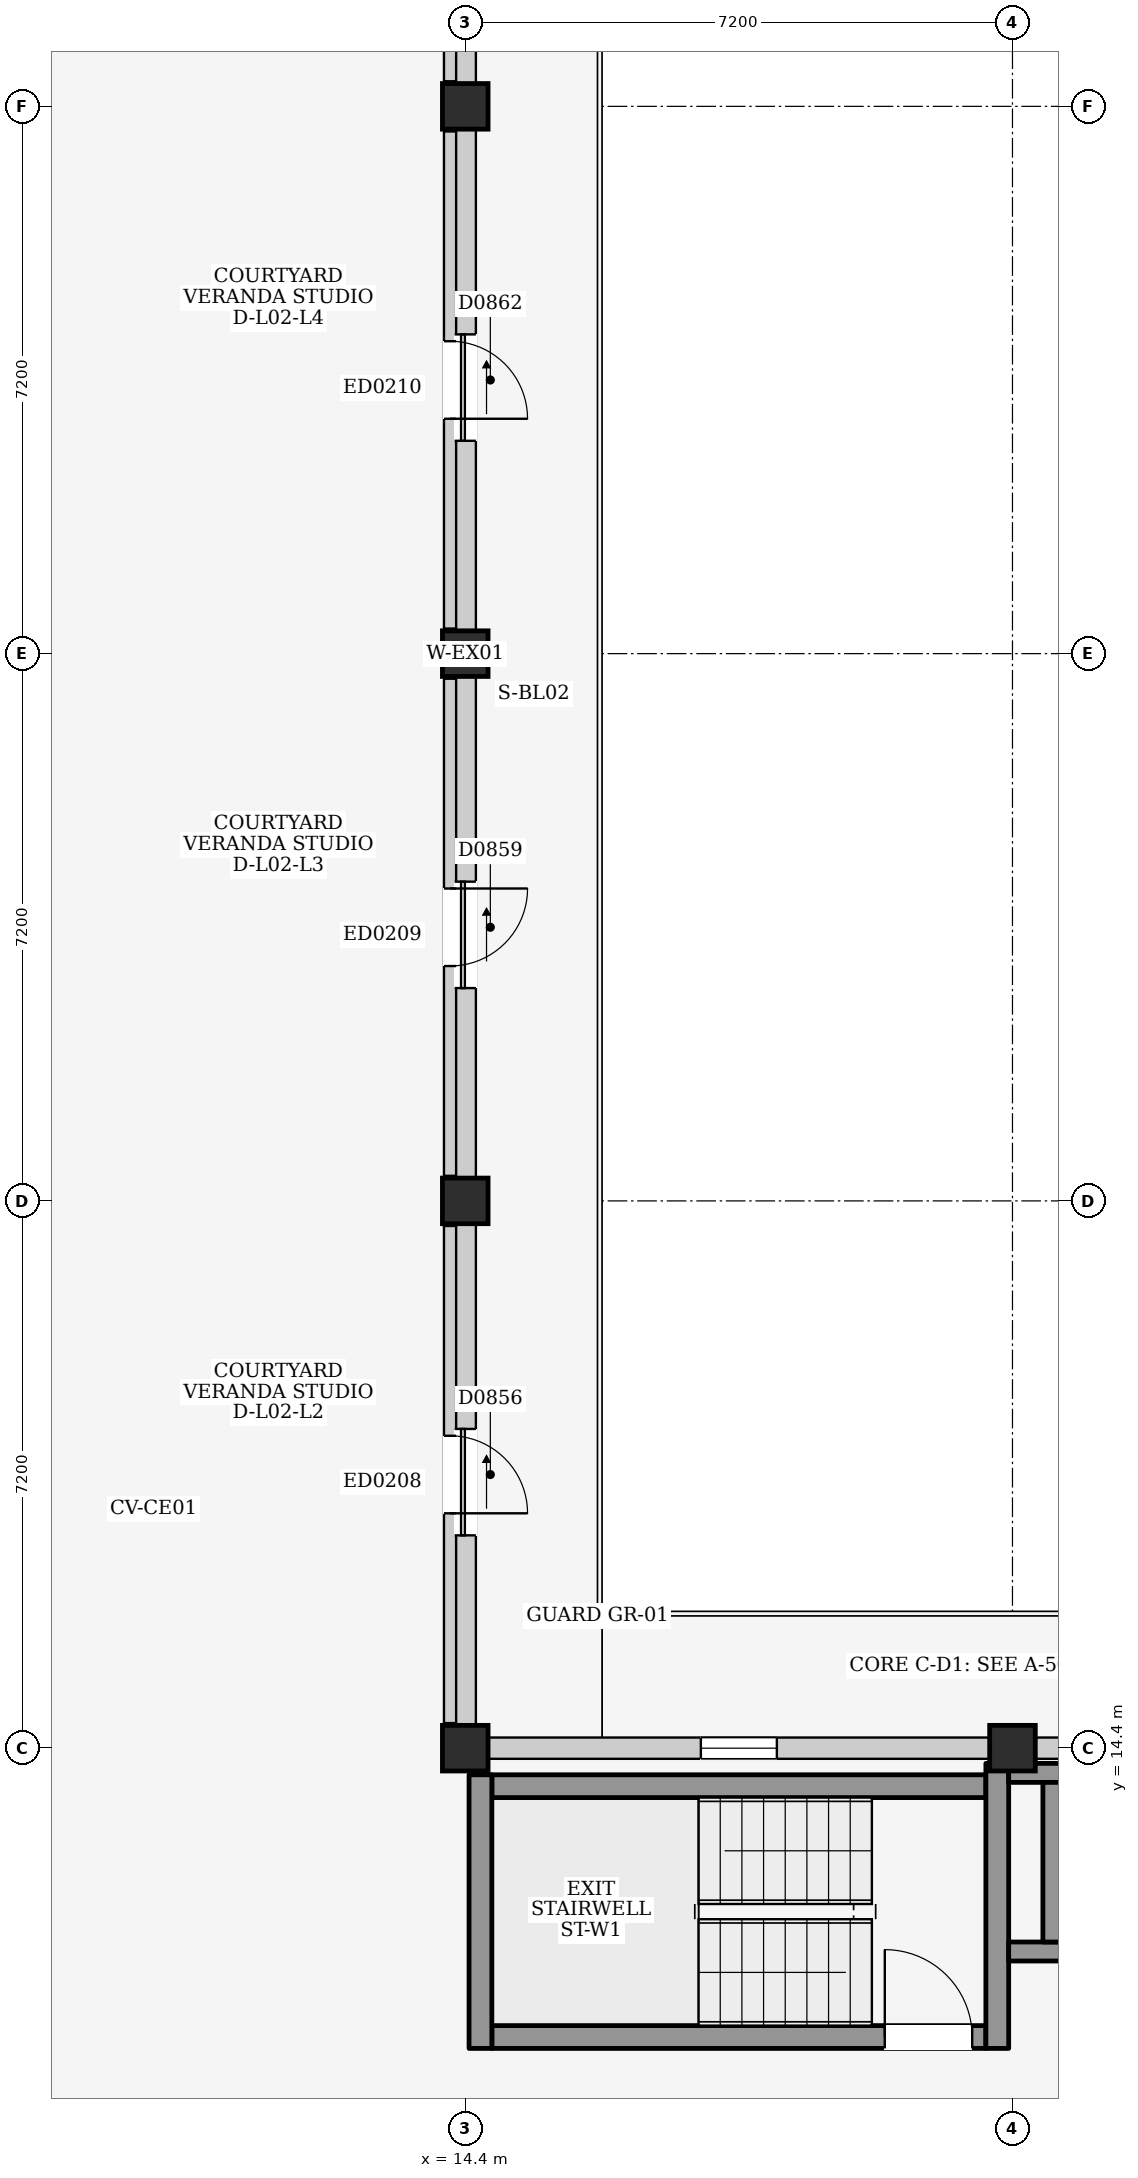
"""IFC4 building model, lengths in metres.
Left out: names, types, materials, properties, quantities, classifications, styles, units other than length and angle.
Written with IfcOpenShell. Run it as: python <this file> out.ifc"""

import sys

from ifc_helpers import new_model, si_unit, direction, frame, frame_2d, origin, origin_2d, place, context, subcontext, project, spatial, rectangle, extrude, element, fill, save


model = new_model("IFC4")
c1 = context("Model", 3, precision=1e-05, world=origin(), true_north=direction((0.0, 1.0)))
c2 = subcontext(c1, "Body", "Model", "MODEL_VIEW")
j1 = project(units=[si_unit("LENGTHUNIT", "METRE"), si_unit("PLANEANGLEUNIT", "RADIAN")], contexts=[c1])
p1 = place(None, origin())
s1 = spatial("IfcSite", under=j1, at=p1, CompositionType="ELEMENT")
p2 = place(p1, origin())
s2 = spatial("IfcBuilding", under=s1, at=p2, CompositionType="ELEMENT")
p3 = place(p2, frame((0.0, 0.0, 9.0)))
s3 = spatial("IfcBuildingStorey", under=s2, at=p3, CompositionType="ELEMENT", Elevation=9.0)
for number, where, z_axis, x_axis in (
    (1, (14.4, 14.4, 0.0), (0.0, 0.0, 1.0), (1.0, 0.0, 0.0)),
    (2, (14.4, 21.6, 0.0), (0.0, 0.0, 1.0), (1.0, 0.0, 0.0)),
    (3, (14.4, 28.8, 0.0), (0.0, 0.0, 1.0), (1.0, 0.0, 0.0)),
    (4, (14.4, 36.0, 0.0), (0.0, 0.0, 1.0), (1.0, 0.0, 0.0)),
    (5, (21.6, 14.4, 0.0), (0.0, 0.0, 1.0), (1.0, 0.0, 0.0)),
):
    element("IfcColumn", number, at=place(p3, frame(where, z_axis=z_axis, x_axis=x_axis)), inside=s3, PredefinedType="COLUMN", context=c2, shape_type="SweptSolid", body=[
        extrude(rectangle(XDim=0.6, YDim=0.6, at=origin_2d()), origin(), (0.0, 0.0, 1.0), 3.2),
    ])
p4 = place(p3, frame((14.4, 14.7, 0.0), z_axis=(0.0, 0.0, 1.0), x_axis=(0.0, 1.0, 0.0)))
e6 = element("IfcWall", 6, at=p4, inside=s3, PredefinedType="ELEMENTEDWALL", context=c2, shape_type="SweptSolid", body=[
    extrude(rectangle(XDim=6.6, YDim=0.28, at=frame_2d((3.3, 0.0))), origin(), (0.0, 0.0, 1.0), 2.395),
])
p5 = place(p4, frame((2.5, 0.0, 0.0)))
e7 = element("IfcOpeningElement", 7, at=p5, cuts=e6, PredefinedType="OPENING", context=c2, shape_type="SweptSolid", body=[
    extrude(rectangle(XDim=1.4, YDim=2.1, at=frame_2d((0.7, 1.05))), frame((0.0, 0.155, 0.0), z_axis=(0.0, -1.0, 0.0), x_axis=(1.0, 0.0, 0.0)), (0.0, 0.0, 1.0), 0.31),
])
p6 = place(p3, frame((14.4, 21.9, 0.0), z_axis=(0.0, 0.0, 1.0), x_axis=(0.0, 1.0, 0.0)))
e8 = element("IfcWall", 8, at=p6, inside=s3, PredefinedType="ELEMENTEDWALL", context=c2, shape_type="SweptSolid", body=[
    extrude(rectangle(XDim=6.6, YDim=0.28, at=frame_2d((3.3, 0.0))), origin(), (0.0, 0.0, 1.0), 2.395),
])
p7 = place(p6, frame((2.5, 0.0, 0.0)))
e9 = element("IfcOpeningElement", 9, at=p7, cuts=e8, PredefinedType="OPENING", context=c2, shape_type="SweptSolid", body=[
    extrude(rectangle(XDim=1.4, YDim=2.1, at=frame_2d((0.7, 1.05))), frame((0.0, 0.155, 0.0), z_axis=(0.0, -1.0, 0.0), x_axis=(1.0, 0.0, 0.0)), (0.0, 0.0, 1.0), 0.31),
])
p8 = place(p3, frame((14.4, 29.1, 0.0), z_axis=(0.0, 0.0, 1.0), x_axis=(0.0, 1.0, 0.0)))
e10 = element("IfcWall", 10, at=p8, inside=s3, PredefinedType="ELEMENTEDWALL", context=c2, shape_type="SweptSolid", body=[
    extrude(rectangle(XDim=6.6, YDim=0.28, at=frame_2d((3.3, 0.0))), origin(), (0.0, 0.0, 1.0), 2.395),
])
p9 = place(p8, frame((2.5, 0.0, 0.0)))
e11 = element("IfcOpeningElement", 11, at=p9, cuts=e10, PredefinedType="OPENING", context=c2, shape_type="SweptSolid", body=[
    extrude(rectangle(XDim=1.4, YDim=2.1, at=frame_2d((0.7, 1.05))), frame((0.0, 0.155, 0.0), z_axis=(0.0, -1.0, 0.0), x_axis=(1.0, 0.0, 0.0)), (0.0, 0.0, 1.0), 0.31),
])
p10 = place(p3, frame((14.4, 36.3, 0.0), z_axis=(0.0, 0.0, 1.0), x_axis=(0.0, 1.0, 0.0)))
e12 = element("IfcWall", 12, at=p10, inside=s3, PredefinedType="ELEMENTEDWALL", context=c2, shape_type="SweptSolid", body=[
    extrude(rectangle(XDim=6.6, YDim=0.28, at=frame_2d((3.3, 0.0))), origin(), (0.0, 0.0, 1.0), 2.395),
])
p11 = place(p10, frame((2.5, 0.0, 0.0)))
e13 = element("IfcOpeningElement", 13, at=p11, cuts=e12, PredefinedType="OPENING", context=c2, shape_type="SweptSolid", body=[
    extrude(rectangle(XDim=1.4, YDim=2.1, at=frame_2d((0.7, 1.05))), frame((0.0, 0.155, 0.0), z_axis=(0.0, -1.0, 0.0), x_axis=(1.0, 0.0, 0.0)), (0.0, 0.0, 1.0), 0.31),
])
p12 = place(p3, frame((14.7, 14.4, 0.0), z_axis=(0.0, 0.0, 1.0), x_axis=(1.0, 0.0, 0.0)))
e14 = element("IfcWall", 14, at=p12, inside=s3, PredefinedType="ELEMENTEDWALL", context=c2, shape_type="SweptSolid", body=[
    extrude(rectangle(XDim=6.6, YDim=0.28, at=frame_2d((3.3, 0.0))), origin(), (0.0, 0.0, 1.0), 2.345),
])
p13 = place(p12, frame((2.8, 0.0, 1.2)))
e15 = element("IfcOpeningElement", 15, at=p13, cuts=e14, PredefinedType="OPENING", context=c2, shape_type="SweptSolid", body=[
    extrude(rectangle(XDim=1.0, YDim=0.9, at=frame_2d((0.5, 0.45))), frame((0.0, 0.155, 0.0), z_axis=(0.0, -1.0, 0.0), x_axis=(1.0, 0.0, 0.0)), (0.0, 0.0, 1.0), 0.31),
])
p14 = place(p3, frame((21.9, 14.4, 0.0), z_axis=(0.0, 0.0, 1.0), x_axis=(1.0, 0.0, 0.0)))
e16 = element("IfcWall", 16, at=p14, inside=s3, PredefinedType="ELEMENTEDWALL", context=c2, shape_type="SweptSolid", body=[
    extrude(rectangle(XDim=6.6, YDim=0.28, at=frame_2d((3.3, 0.0))), origin(), (0.0, 0.0, 1.0), 2.345),
])
p15 = place(p14, frame((2.8, 0.0, 1.2)))
e17 = element("IfcOpeningElement", 17, at=p15, cuts=e16, PredefinedType="OPENING", context=c2, shape_type="SweptSolid", body=[
    extrude(rectangle(XDim=1.0, YDim=0.9, at=frame_2d((0.5, 0.45))), frame((0.0, 0.155, 0.0), z_axis=(0.0, -1.0, 0.0), x_axis=(1.0, 0.0, 0.0)), (0.0, 0.0, 1.0), 0.31),
])
p16 = place(p3, frame((14.75, 10.6, 0.0), z_axis=(0.0, 0.0, 1.0), x_axis=(1.0, 0.0, 0.0)))
e18 = element("IfcWall", 18, at=p16, inside=s3, PredefinedType="SHEAR", context=c2, shape_type="SweptSolid", body=[
    extrude(rectangle(XDim=6.5, YDim=0.3, at=frame_2d((3.25, 0.0))), origin(), (0.0, 0.0, 1.0), 2.96),
])
p17 = place(p16, frame((5.17, 0.0, 0.0)))
e19 = element("IfcOpeningElement", 19, at=p17, cuts=e18, PredefinedType="OPENING", context=c2, shape_type="SweptSolid", body=[
    extrude(rectangle(XDim=1.15, YDim=2.2, at=frame_2d((0.575, 1.1))), frame((0.0, 0.165, 0.0), z_axis=(0.0, -1.0, 0.0), x_axis=(1.0, 0.0, 0.0)), (0.0, 0.0, 1.0), 0.33),
])
p18 = place(p3, frame((14.75, 13.9, 0.0), z_axis=(0.0, 0.0, 1.0), x_axis=(1.0, 0.0, 0.0)))
e20 = element("IfcWall", 20, at=p18, inside=s3, PredefinedType="SHEAR", context=c2, shape_type="SweptSolid", body=[
    extrude(rectangle(XDim=6.5, YDim=0.3, at=frame_2d((3.25, 0.0))), origin(), (0.0, 0.0, 1.0), 2.96),
])
p19 = place(p3, frame((14.6, 10.45, 0.0), z_axis=(0.0, 0.0, 1.0), x_axis=(0.0, 1.0, 0.0)))
e21 = element("IfcWall", 21, at=p19, inside=s3, PredefinedType="SHEAR", context=c2, shape_type="SweptSolid", body=[
    extrude(rectangle(XDim=3.6, YDim=0.3, at=frame_2d((1.8, 0.0))), origin(), (0.0, 0.0, 1.0), 2.96),
])
p20 = place(p3, frame((21.4, 10.45, 0.0), z_axis=(0.0, 0.0, 1.0), x_axis=(0.0, 1.0, 0.0)))
e22 = element("IfcWall", 22, at=p20, inside=s3, PredefinedType="SHEAR", context=c2, shape_type="SweptSolid", body=[
    extrude(rectangle(XDim=3.75, YDim=0.3, at=frame_2d((1.875, 0.0))), origin(), (0.0, 0.0, 1.0), 2.96),
])
p21 = place(p3, frame((21.55, 11.725, 0.0), z_axis=(0.0, 0.0, 1.0), x_axis=(1.0, 0.0, 0.0)))
e23 = element("IfcWall", 23, at=p21, inside=s3, PredefinedType="SHEAR", context=c2, shape_type="SweptSolid", body=[
    extrude(rectangle(XDim=2.55, YDim=0.25, at=frame_2d((1.275, 0.0))), origin(), (0.0, 0.0, 1.0), 2.96),
])
p22 = place(p21, frame((0.95, 0.0, 0.0)))
e24 = element("IfcOpeningElement", 24, at=p22, cuts=e23, PredefinedType="OPENING", context=c2, shape_type="SweptSolid", body=[
    extrude(rectangle(XDim=1.1, YDim=2.15, at=frame_2d((0.55, 1.075))), frame((0.0, 0.14, 0.0), z_axis=(0.0, -1.0, 0.0), x_axis=(1.0, 0.0, 0.0)), (0.0, 0.0, 1.0), 0.28),
])
p23 = place(p3, frame((21.55, 14.075, 0.0), z_axis=(0.0, 0.0, 1.0), x_axis=(1.0, 0.0, 0.0)))
e25 = element("IfcWall", 25, at=p23, inside=s3, PredefinedType="SHEAR", context=c2, shape_type="SweptSolid", body=[
    extrude(rectangle(XDim=2.55, YDim=0.25, at=frame_2d((1.275, 0.0))), origin(), (0.0, 0.0, 1.0), 2.96),
])
p24 = place(p3, frame((22.125, 11.85, 0.0), z_axis=(0.0, 0.0, 1.0), x_axis=(0.0, 1.0, 0.0)))
e26 = element("IfcWall", 26, at=p24, inside=s3, PredefinedType="SHEAR", context=c2, shape_type="SweptSolid", body=[
    extrude(rectangle(XDim=2.1, YDim=0.25, at=frame_2d((1.05, 0.0))), origin(), (0.0, 0.0, 1.0), 2.96),
])
p25 = place(p3, frame((14.2, 14.73, 0.0), z_axis=(0.0, 0.0, 1.0), x_axis=(0.0, 1.0, 0.0)))
e27 = element("IfcWall", 27, at=p25, inside=s3, PredefinedType="PARTITIONING", context=c2, shape_type="SweptSolid", body=[
    extrude(rectangle(XDim=6.54, YDim=0.16, at=frame_2d((3.27, 0.0))), origin(), (0.0, 0.0, 1.0), 2.395),
])
p26 = place(p25, frame((2.76, 0.0, 0.0)))
e28 = element("IfcOpeningElement", 28, at=p26, cuts=e27, PredefinedType="OPENING", context=c2, shape_type="SweptSolid", body=[
    extrude(rectangle(XDim=1.02, YDim=2.18, at=frame_2d((0.51, 1.09))), frame((0.0, 0.095, 0.0), z_axis=(0.0, -1.0, 0.0), x_axis=(1.0, 0.0, 0.0)), (0.0, 0.0, 1.0), 0.19),
])
p27 = place(p3, frame((14.2, 21.93, 0.0), z_axis=(0.0, 0.0, 1.0), x_axis=(0.0, 1.0, 0.0)))
e29 = element("IfcWall", 29, at=p27, inside=s3, PredefinedType="PARTITIONING", context=c2, shape_type="SweptSolid", body=[
    extrude(rectangle(XDim=6.54, YDim=0.16, at=frame_2d((3.27, 0.0))), origin(), (0.0, 0.0, 1.0), 2.395),
])
p28 = place(p27, frame((2.76, 0.0, 0.0)))
e30 = element("IfcOpeningElement", 30, at=p28, cuts=e29, PredefinedType="OPENING", context=c2, shape_type="SweptSolid", body=[
    extrude(rectangle(XDim=1.02, YDim=2.18, at=frame_2d((0.51, 1.09))), frame((0.0, 0.095, 0.0), z_axis=(0.0, -1.0, 0.0), x_axis=(1.0, 0.0, 0.0)), (0.0, 0.0, 1.0), 0.19),
])
p29 = place(p3, frame((14.2, 29.13, 0.0), z_axis=(0.0, 0.0, 1.0), x_axis=(0.0, 1.0, 0.0)))
e31 = element("IfcWall", 31, at=p29, inside=s3, PredefinedType="PARTITIONING", context=c2, shape_type="SweptSolid", body=[
    extrude(rectangle(XDim=6.54, YDim=0.16, at=frame_2d((3.27, 0.0))), origin(), (0.0, 0.0, 1.0), 2.395),
])
p30 = place(p29, frame((2.76, 0.0, 0.0)))
e32 = element("IfcOpeningElement", 32, at=p30, cuts=e31, PredefinedType="OPENING", context=c2, shape_type="SweptSolid", body=[
    extrude(rectangle(XDim=1.02, YDim=2.18, at=frame_2d((0.51, 1.09))), frame((0.0, 0.095, 0.0), z_axis=(0.0, -1.0, 0.0), x_axis=(1.0, 0.0, 0.0)), (0.0, 0.0, 1.0), 0.19),
])
p31 = place(p3, frame((14.2, 36.33, 0.0), z_axis=(0.0, 0.0, 1.0), x_axis=(0.0, 1.0, 0.0)))
e33 = element("IfcWall", 33, at=p31, inside=s3, PredefinedType="PARTITIONING", context=c2, shape_type="SweptSolid", body=[
    extrude(rectangle(XDim=6.54, YDim=0.16, at=frame_2d((3.27, 0.0))), origin(), (0.0, 0.0, 1.0), 2.395),
])
p32 = place(p31, frame((2.76, 0.0, 0.0)))
e34 = element("IfcOpeningElement", 34, at=p32, cuts=e33, PredefinedType="OPENING", context=c2, shape_type="SweptSolid", body=[
    extrude(rectangle(XDim=1.02, YDim=2.18, at=frame_2d((0.51, 1.09))), frame((0.0, 0.095, 0.0), z_axis=(0.0, -1.0, 0.0), x_axis=(1.0, 0.0, 0.0)), (0.0, 0.0, 1.0), 0.19),
])
p33 = place(p5, frame((1.4, 0.0, 0.0), z_axis=(0.0, 0.0, 1.0), x_axis=(-1.0, 0.0, 0.0)))
e35 = element("IfcDoor", 35, at=p33, inside=s3, OperationType="SLIDING_TO_RIGHT", PredefinedType="DOOR", context=c2, shape_type="SweptSolid", body=[
    extrude(rectangle(XDim=1.4, YDim=2.1, at=frame_2d((0.7, 1.05))), frame((0.0, 0.025, 0.0), z_axis=(0.0, -1.0, 0.0), x_axis=(1.0, 0.0, 0.0)), (0.0, 0.0, 1.0), 0.05),
])
fill(e7, e35)
p34 = place(p7, frame((1.4, 0.0, 0.0), z_axis=(0.0, 0.0, 1.0), x_axis=(-1.0, 0.0, 0.0)))
e36 = element("IfcDoor", 36, at=p34, inside=s3, OperationType="SLIDING_TO_RIGHT", PredefinedType="DOOR", context=c2, shape_type="SweptSolid", body=[
    extrude(rectangle(XDim=1.4, YDim=2.1, at=frame_2d((0.7, 1.05))), frame((0.0, 0.025, 0.0), z_axis=(0.0, -1.0, 0.0), x_axis=(1.0, 0.0, 0.0)), (0.0, 0.0, 1.0), 0.05),
])
fill(e9, e36)
p35 = place(p9, frame((1.4, 0.0, 0.0), z_axis=(0.0, 0.0, 1.0), x_axis=(-1.0, 0.0, 0.0)))
e37 = element("IfcDoor", 37, at=p35, inside=s3, OperationType="SLIDING_TO_RIGHT", PredefinedType="DOOR", context=c2, shape_type="SweptSolid", body=[
    extrude(rectangle(XDim=1.4, YDim=2.1, at=frame_2d((0.7, 1.05))), frame((0.0, 0.025, 0.0), z_axis=(0.0, -1.0, 0.0), x_axis=(1.0, 0.0, 0.0)), (0.0, 0.0, 1.0), 0.05),
])
fill(e11, e37)
p36 = place(p13, origin())
e38 = element("IfcWindow", 38, at=p36, inside=s3, PartitioningType="SINGLE_PANEL", PredefinedType="WINDOW", context=c2, shape_type="SweptSolid", body=[
    extrude(rectangle(XDim=1.0, YDim=0.9, at=frame_2d((0.5, 0.45))), frame((0.0, 0.03, 0.0), z_axis=(0.0, -1.0, 0.0), x_axis=(1.0, 0.0, 0.0)), (0.0, 0.0, 1.0), 0.06),
])
fill(e15, e38)
p37 = place(p17, origin())
e39 = element("IfcDoor", 39, at=p37, inside=s3, OperationType="SINGLE_SWING_LEFT", PredefinedType="DOOR", context=c2, shape_type="SweptSolid", body=[
    extrude(rectangle(XDim=1.15, YDim=2.2, at=frame_2d((0.575, 1.1))), frame((0.0, 0.025, 0.0), z_axis=(0.0, -1.0, 0.0), x_axis=(1.0, 0.0, 0.0)), (0.0, 0.0, 1.0), 0.05),
])
fill(e19, e39)
p38 = place(p26, frame((1.02, 0.0, 0.0), z_axis=(0.0, 0.0, 1.0), x_axis=(-1.0, 0.0, 0.0)))
e40 = element("IfcDoor", 40, at=p38, inside=s3, OperationType="SINGLE_SWING_RIGHT", PredefinedType="DOOR", context=c2, shape_type="SweptSolid", body=[
    extrude(rectangle(XDim=1.02, YDim=2.18, at=frame_2d((0.51, 1.09))), frame((0.0, 0.025, 0.0), z_axis=(0.0, -1.0, 0.0), x_axis=(1.0, 0.0, 0.0)), (0.0, 0.0, 1.0), 0.05),
])
fill(e28, e40)
p39 = place(p28, frame((1.02, 0.0, 0.0), z_axis=(0.0, 0.0, 1.0), x_axis=(-1.0, 0.0, 0.0)))
e41 = element("IfcDoor", 41, at=p39, inside=s3, OperationType="SINGLE_SWING_LEFT", PredefinedType="DOOR", context=c2, shape_type="SweptSolid", body=[
    extrude(rectangle(XDim=1.02, YDim=2.18, at=frame_2d((0.51, 1.09))), frame((0.0, 0.025, 0.0), z_axis=(0.0, -1.0, 0.0), x_axis=(1.0, 0.0, 0.0)), (0.0, 0.0, 1.0), 0.05),
])
fill(e30, e41)
p40 = place(p30, frame((1.02, 0.0, 0.0), z_axis=(0.0, 0.0, 1.0), x_axis=(-1.0, 0.0, 0.0)))
e42 = element("IfcDoor", 42, at=p40, inside=s3, OperationType="SINGLE_SWING_RIGHT", PredefinedType="DOOR", context=c2, shape_type="SweptSolid", body=[
    extrude(rectangle(XDim=1.02, YDim=2.18, at=frame_2d((0.51, 1.09))), frame((0.0, 0.025, 0.0), z_axis=(0.0, -1.0, 0.0), x_axis=(1.0, 0.0, 0.0)), (0.0, 0.0, 1.0), 0.05),
])
fill(e32, e42)
save(model, sys.argv[1])
